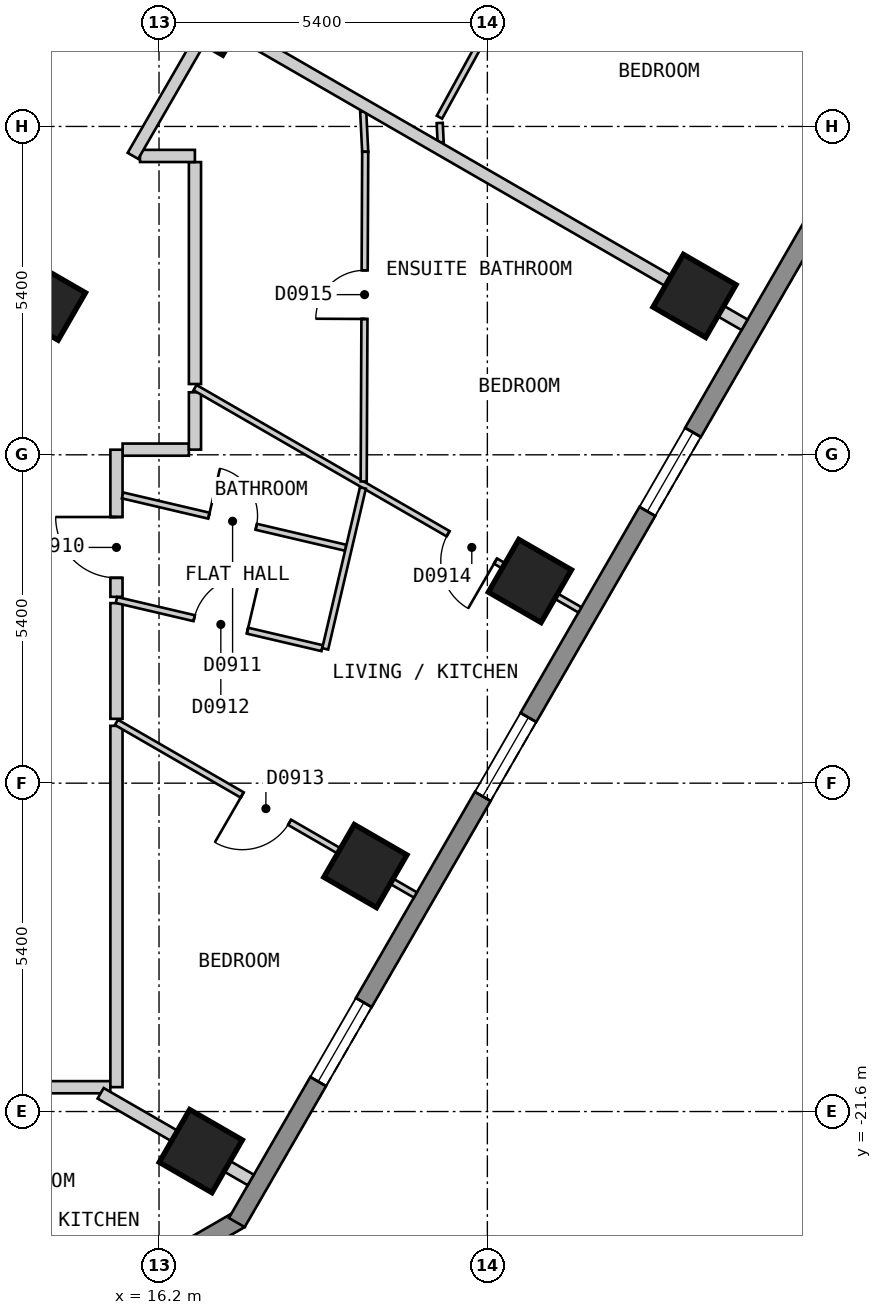
"""IFC4 building model, lengths in metres.
Left out: names, types, materials, properties, quantities, classifications, styles, units other than length and angle.
Written with IfcOpenShell. Run it as: python <this file> out.ifc"""

import sys

from ifc_helpers import new_model, si_unit, direction, frame, frame_2d, origin, origin_2d, place, context, subcontext, project, spatial, polyline, rectangle, outline, extrude, element, fill, save


model = new_model("IFC4")
c1 = context("Model", 3, precision=1e-05, world=origin(), true_north=direction((0.0, 1.0)))
c2 = subcontext(c1, "Body", "Model", "MODEL_VIEW")
j1 = project(units=[si_unit("LENGTHUNIT", "METRE"), si_unit("PLANEANGLEUNIT", "RADIAN")], contexts=[c1])
p1 = place(None, origin())
s1 = spatial("IfcSite", under=j1, at=p1, CompositionType="ELEMENT")
p2 = place(p1, origin())
s2 = spatial("IfcBuilding", under=s1, at=p2, CompositionType="ELEMENT")
p3 = place(p2, frame((0.0, 0.0, 90.0)))
s3 = spatial("IfcBuildingStorey", under=s2, at=p3, CompositionType="ELEMENT", Elevation=90.0)
for number, where, z_axis, x_axis in (
    (1, (16.887, -22.251, 0.0), (0.0, 0.0, 1.0), (0.5, 0.866, 0.0)),
    (2, (19.594, -17.563, 0.0), (0.0, 0.0, 1.0), (0.5, 0.866, 0.0)),
    (3, (22.3, -12.875, 0.0), (0.0, 0.0, 1.0), (0.5, 0.866, 0.0)),
    (4, (25.007, -8.187, 0.0), (0.0, 0.0, 1.0), (0.5, 0.866, 0.0)),
):
    element("IfcColumn", number, at=place(p3, frame(where, z_axis=z_axis, x_axis=x_axis)), inside=s3, PredefinedType="COLUMN", context=c2, shape_type="SweptSolid", body=[
        extrude(rectangle(XDim=1.0, YDim=1.0, at=origin_2d()), origin(), (0.0, 0.0, 1.0), 3.0),
    ])
for number, where, z_axis, x_axis in (
    (5, (14.376, -8.3, 0.0), (0.0, 0.0, 1.0), (0.5, 0.866, 0.0)),
    (6, (17.083, -3.612, 0.0), (0.0, 0.0, 1.0), (0.5, 0.866, 0.0)),
):
    element("IfcColumn", number, at=place(p3, frame(where, z_axis=z_axis, x_axis=x_axis)), inside=s3, PredefinedType="COLUMN", context=c2, shape_type="SweptSolid", body=[
        extrude(rectangle(XDim=0.9, YDim=0.9, at=origin_2d()), origin(), (0.0, 0.0, 1.0), 3.0),
    ])
p4 = place(p3, frame((13.204, -25.87, 0.0), z_axis=(0.0, 0.0, 1.0), x_axis=(0.866010750942, 0.50002537861, 0.0)))
e7 = element("IfcWall", 7, at=p4, inside=s3, PredefinedType="SOLIDWALL", context=c2, shape_type="SweptSolid", body=[
    extrude(outline(polyline([(0.0, -0.15), (5.0, -0.15), (4.919, 0.15), (0.08, 0.15), (0.0, -0.15)])), origin(), (0.0, 0.0, 1.0), 2.7),
])
p5 = place(p4, frame((0.65, 0.0, 0.15)))
e8 = element("IfcOpeningElement", 8, at=p5, cuts=e7, PredefinedType="OPENING", context=c2, shape_type="SweptSolid", body=[
    extrude(rectangle(XDim=1.2, YDim=2.1, at=frame_2d((0.6, 1.05))), frame((0.0, 0.16, 0.0), z_axis=(0.0, -1.0, 0.0), x_axis=(1.0, 0.0, 0.0)), (0.0, 0.0, 1.0), 0.32),
])
p6 = place(p3, frame((17.479, -23.425, 0.0), z_axis=(0.0, 0.0, 1.0), x_axis=(0.500035407905, 0.866004960056, 0.0)))
e9 = element("IfcWall", 9, at=p6, inside=s3, PredefinedType="SOLIDWALL", context=c2, shape_type="SweptSolid", body=[
    extrude(outline(polyline([(0.0, -0.15), (23.094, -0.15), (23.014, 0.15), (0.08, 0.15), (0.0, -0.15)])), origin(), (0.0, 0.0, 1.0), 2.7),
])
p7 = place(p6, frame((2.677, 0.0, 0.15)))
e10 = element("IfcOpeningElement", 10, at=p7, cuts=e9, PredefinedType="OPENING", context=c2, shape_type="SweptSolid", body=[
    extrude(rectangle(XDim=1.5, YDim=2.1, at=frame_2d((0.75, 1.05))), frame((0.0, 0.16, 0.0), z_axis=(0.0, -1.0, 0.0), x_axis=(1.0, 0.0, 0.0)), (0.0, 0.0, 1.0), 0.32),
])
p8 = place(p6, frame((8.091, 0.0, 0.15)))
e11 = element("IfcOpeningElement", 11, at=p8, cuts=e9, PredefinedType="OPENING", context=c2, shape_type="SweptSolid", body=[
    extrude(rectangle(XDim=1.5, YDim=2.1, at=frame_2d((0.75, 1.05))), frame((0.0, 0.16, 0.0), z_axis=(0.0, -1.0, 0.0), x_axis=(1.0, 0.0, 0.0)), (0.0, 0.0, 1.0), 0.32),
])
p9 = place(p6, frame((13.504, 0.0, 0.15)))
e12 = element("IfcOpeningElement", 12, at=p9, cuts=e9, PredefinedType="OPENING", context=c2, shape_type="SweptSolid", body=[
    extrude(rectangle(XDim=1.5, YDim=2.1, at=frame_2d((0.75, 1.05))), frame((0.0, 0.16, 0.0), z_axis=(0.0, -1.0, 0.0), x_axis=(1.0, 0.0, 0.0)), (0.0, 0.0, 1.0), 0.32),
])
p10 = place(p6, frame((18.917, 0.0, 0.15)))
e13 = element("IfcOpeningElement", 13, at=p10, cuts=e9, PredefinedType="OPENING", context=c2, shape_type="SweptSolid", body=[
    extrude(rectangle(XDim=1.5, YDim=2.1, at=frame_2d((0.75, 1.05))), frame((0.0, 0.16, 0.0), z_axis=(0.0, -1.0, 0.0), x_axis=(1.0, 0.0, 0.0)), (0.0, 0.0, 1.0), 0.32),
])
p11 = place(p3, frame((15.5, -13.239, 0.0), z_axis=(0.0, 0.0, 1.0), x_axis=(0.0, -1.0, 0.0)))
e14 = element("IfcWall", 14, at=p11, inside=s3, PredefinedType="PARTITIONING", context=c2, shape_type="SweptSolid", body=[
    extrude(rectangle(XDim=1.903, YDim=0.2, at=frame_2d((0.952, 0.0))), origin(), (0.0, 0.0, 1.0), 2.7),
])
p12 = place(p3, frame((16.791, -5.986, 0.0), z_axis=(0.0, 0.0, 1.0), x_axis=(0.0, -1.0, 0.0)))
e15 = element("IfcWall", 15, at=p12, inside=s3, PredefinedType="PARTITIONING", context=c2, shape_type="SweptSolid", body=[
    extrude(rectangle(XDim=3.65, YDim=0.2, at=frame_2d((1.825, 0.0))), origin(), (0.0, 0.0, 1.0), 2.7),
])
p13 = place(p3, frame((15.887, -5.885, 0.0), z_axis=(0.0, 0.0, 1.0), x_axis=(1.0, 0.0, 0.0)))
e16 = element("IfcWall", 16, at=p13, inside=s3, PredefinedType="PARTITIONING", context=c2, shape_type="SweptSolid", body=[
    extrude(rectangle(XDim=0.903, YDim=0.2, at=frame_2d((0.452, 0.0))), origin(), (0.0, 0.0, 1.0), 2.7),
])
p14 = place(p3, frame((15.601, -10.715, 0.0), z_axis=(0.0, 0.0, 1.0), x_axis=(1.0, 0.0, 0.0)))
e17 = element("IfcWall", 17, at=p14, inside=s3, PredefinedType="PARTITIONING", context=c2, shape_type="SweptSolid", body=[
    extrude(rectangle(XDim=1.09, YDim=0.2, at=frame_2d((0.545, 0.0))), origin(), (0.0, 0.0, 1.0), 2.7),
])
p15 = place(p3, frame((-15.499, -21.2, 0.0), z_axis=(0.0, 0.0, 1.0), x_axis=(1.0, 0.0, 0.0)))
e18 = element("IfcWall", 18, at=p15, inside=s3, PredefinedType="PARTITIONING", context=c2, shape_type="SweptSolid", body=[
    extrude(rectangle(XDim=30.898, YDim=0.2, at=frame_2d((15.449, 0.0))), origin(), (0.0, 0.0, 1.0), 2.7),
])
p16 = place(p15, frame((4.954, 0.0, 0.0)))
e19 = element("IfcOpeningElement", 19, at=p16, cuts=e18, PredefinedType="OPENING", context=c2, shape_type="SweptSolid", body=[
    extrude(rectangle(XDim=1.0, YDim=2.1, at=frame_2d((0.5, 1.05))), frame((0.0, 0.11, 0.0), z_axis=(0.0, -1.0, 0.0), x_axis=(1.0, 0.0, 0.0)), (0.0, 0.0, 1.0), 0.22),
])
p17 = place(p15, frame((25.046, 0.0, 0.0)))
e20 = element("IfcOpeningElement", 20, at=p17, cuts=e18, PredefinedType="OPENING", context=c2, shape_type="SweptSolid", body=[
    extrude(rectangle(XDim=1.0, YDim=2.1, at=frame_2d((0.5, 1.05))), frame((0.0, 0.11, 0.0), z_axis=(0.0, -1.0, 0.0), x_axis=(1.0, 0.0, 0.0)), (0.0, 0.0, 1.0), 0.22),
])
p18 = place(p3, frame((15.771, -5.884, 0.0), z_axis=(0.0, 0.0, 1.0), x_axis=(0.499939494019, 0.866060334111, 0.0)))
e21 = element("IfcWall", 21, at=p18, inside=s3, PredefinedType="PARTITIONING", context=c2, shape_type="SweptSolid", body=[
    extrude(rectangle(XDim=5.583, YDim=0.2, at=frame_2d((2.792, 0.0))), origin(), (0.0, 0.0, 1.0), 2.7),
])
p19 = place(p3, frame((15.5, -21.199, 0.0), z_axis=(0.0, 0.0, 1.0), x_axis=(0.0, 1.0, 0.0)))
e22 = element("IfcWall", 22, at=p19, inside=s3, PredefinedType="PARTITIONING", context=c2, shape_type="SweptSolid", body=[
    extrude(rectangle(XDim=5.942, YDim=0.2, at=frame_2d((2.971, 0.0))), origin(), (0.0, 0.0, 1.0), 2.7),
])
p20 = place(p3, frame((15.5, -13.136, 0.0), z_axis=(0.0, 0.0, 1.0), x_axis=(0.0, 1.0, 0.0)))
e23 = element("IfcWall", 23, at=p20, inside=s3, PredefinedType="PARTITIONING", context=c2, shape_type="SweptSolid", body=[
    extrude(rectangle(XDim=2.42, YDim=0.2, at=frame_2d((1.21, 0.0))), origin(), (0.0, 0.0, 1.0), 2.7),
])
p21 = place(p20, frame((0.313, 0.0, 0.0)))
e24 = element("IfcOpeningElement", 24, at=p21, cuts=e23, PredefinedType="OPENING", context=c2, shape_type="SweptSolid", body=[
    extrude(rectangle(XDim=1.0, YDim=2.1, at=frame_2d((0.5, 1.05))), frame((0.0, 0.11, 0.0), z_axis=(0.0, -1.0, 0.0), x_axis=(1.0, 0.0, 0.0)), (0.0, 0.0, 1.0), 0.22),
])
p22 = place(p3, frame((16.791, -10.715, 0.0), z_axis=(0.0, 0.0, 1.0), x_axis=(0.0, 1.0, 0.0)))
e25 = element("IfcWall", 25, at=p22, inside=s3, PredefinedType="PARTITIONING", context=c2, shape_type="SweptSolid", body=[
    extrude(rectangle(XDim=0.943, YDim=0.2, at=frame_2d((0.472, 0.0))), origin(), (0.0, 0.0, 1.0), 2.7),
])
p23 = place(p3, frame((19.558, -5.156, 0.0), z_axis=(0.0, 0.0, 1.0), x_axis=(0.04980880462, -0.998758771167, 0.0)))
e26 = element("IfcWall", 26, at=p23, inside=s3, PredefinedType="PARTITIONING", context=c2, shape_type="SweptSolid", body=[
    extrude(rectangle(XDim=0.662, YDim=0.1, at=frame_2d((0.331, 0.0))), origin(), (0.0, 0.0, 1.0), 2.7),
])
p24 = place(p3, frame((20.816, -5.343, 0.0), z_axis=(0.0, 0.0, 1.0), x_axis=(0.050626241319, -0.998717669659, 0.0)))
e27 = element("IfcWall", 27, at=p24, inside=s3, PredefinedType="PARTITIONING", context=c2, shape_type="SweptSolid", body=[
    extrude(rectangle(XDim=0.318, YDim=0.1, at=frame_2d((0.159, 0.0))), origin(), (0.0, 0.0, 1.0), 2.7),
])
p25 = place(p3, frame((15.6, -11.468, 0.0), z_axis=(0.0, 0.0, 1.0), x_axis=(0.973574036597, -0.228371616592, 0.0)))
e28 = element("IfcWall", 28, at=p25, inside=s3, PredefinedType="PARTITIONING", context=c2, shape_type="SweptSolid", body=[
    extrude(rectangle(XDim=3.771, YDim=0.1, at=frame_2d((1.885, 0.0))), origin(), (0.0, 0.0, 1.0), 2.7),
])
p26 = place(p25, frame((1.459, 0.0, 0.0)))
e29 = element("IfcOpeningElement", 29, at=p26, cuts=e28, PredefinedType="OPENING", context=c2, shape_type="SweptSolid", body=[
    extrude(rectangle(XDim=0.8, YDim=2.1, at=frame_2d((0.4, 1.05))), frame((0.0, 0.06, 0.0), z_axis=(0.0, -1.0, 0.0), x_axis=(1.0, 0.0, 0.0)), (0.0, 0.0, 1.0), 0.12),
])
p27 = place(p3, frame((15.5, -13.187, 0.0), z_axis=(0.0, 0.0, 1.0), x_axis=(0.973612163993, -0.228209014119, 0.0)))
e30 = element("IfcWall", 30, at=p27, inside=s3, PredefinedType="PARTITIONING", context=c2, shape_type="SweptSolid", body=[
    extrude(rectangle(XDim=3.475, YDim=0.1, at=frame_2d((1.737, 0.0))), origin(), (0.0, 0.0, 1.0), 2.7),
])
p28 = place(p27, frame((1.313, 0.0, 0.0)))
e31 = element("IfcOpeningElement", 31, at=p28, cuts=e30, PredefinedType="OPENING", context=c2, shape_type="SweptSolid", body=[
    extrude(rectangle(XDim=0.9, YDim=2.1, at=frame_2d((0.45, 1.05))), frame((0.0, 0.06, 0.0), z_axis=(0.0, -1.0, 0.0), x_axis=(1.0, 0.0, 0.0)), (0.0, 0.0, 1.0), 0.12),
])
p29 = place(p3, frame((15.5, -15.2, 0.0), z_axis=(0.0, 0.0, 1.0), x_axis=(0.866035181374, -0.499983064336, 0.0)))
e32 = element("IfcWall", 32, at=p29, inside=s3, PredefinedType="PARTITIONING", context=c2, shape_type="SweptSolid", body=[
    extrude(rectangle(XDim=5.677, YDim=0.1, at=frame_2d((2.838, 0.0))), origin(), (0.0, 0.0, 1.0), 2.7),
])
p30 = place(p29, frame((2.388, 0.0, 0.0)))
e33 = element("IfcOpeningElement", 33, at=p30, cuts=e32, PredefinedType="OPENING", context=c2, shape_type="SweptSolid", body=[
    extrude(rectangle(XDim=0.9, YDim=2.1, at=frame_2d((0.45, 1.05))), frame((0.0, 0.06, 0.0), z_axis=(0.0, -1.0, 0.0), x_axis=(1.0, 0.0, 0.0)), (0.0, 0.0, 1.0), 0.12),
])
p31 = place(p3, frame((16.792, -9.695, 0.0), z_axis=(0.0, 0.0, 1.0), x_axis=(0.86603765469, -0.499978780208, 0.0)))
e34 = element("IfcWall", 34, at=p31, inside=s3, PredefinedType="PARTITIONING", context=c2, shape_type="SweptSolid", body=[
    extrude(rectangle(XDim=7.31, YDim=0.1, at=frame_2d((3.655, 0.0))), origin(), (0.0, 0.0, 1.0), 2.7),
])
p32 = place(p31, frame((4.806, 0.0, 0.0)))
e35 = element("IfcOpeningElement", 35, at=p32, cuts=e34, PredefinedType="OPENING", context=c2, shape_type="SweptSolid", body=[
    extrude(rectangle(XDim=0.9, YDim=2.1, at=frame_2d((0.45, 1.05))), frame((0.0, 0.06, 0.0), z_axis=(0.0, -1.0, 0.0), x_axis=(1.0, 0.0, 0.0)), (0.0, 0.0, 1.0), 0.12),
])
p33 = place(p3, frame((20.812, -5.248, 0.0), z_axis=(0.0, 0.0, 1.0), x_axis=(0.481196609449, 0.876612698434, 0.0)))
e36 = element("IfcWall", 36, at=p33, inside=s3, PredefinedType="PARTITIONING", context=c2, shape_type="SweptSolid", body=[
    extrude(rectangle(XDim=4.79, YDim=0.1, at=frame_2d((2.395, 0.0))), origin(), (0.0, 0.0, 1.0), 2.7),
])
p34 = place(p33, frame((2.023, 0.0, 0.0)))
e37 = element("IfcOpeningElement", 37, at=p34, cuts=e36, PredefinedType="OPENING", context=c2, shape_type="SweptSolid", body=[
    extrude(rectangle(XDim=0.8, YDim=2.1, at=frame_2d((0.4, 1.05))), frame((0.0, 0.06, 0.0), z_axis=(0.0, -1.0, 0.0), x_axis=(1.0, 0.0, 0.0)), (0.0, 0.0, 1.0), 0.12),
])
p35 = place(p3, frame((18.933, -13.991, 0.0), z_axis=(0.0, 0.0, 1.0), x_axis=(0.228172687949, 0.97362067792, 0.0)))
e38 = element("IfcWall", 38, at=p35, inside=s3, PredefinedType="PARTITIONING", context=c2, shape_type="SweptSolid", body=[
    extrude(rectangle(XDim=2.717, YDim=0.1, at=frame_2d((1.358, 0.0))), origin(), (0.0, 0.0, 1.0), 2.7),
])
p36 = place(p3, frame((19.566, -11.238, 0.0), z_axis=(0.0, 0.0, 1.0), x_axis=(0.004638545009, 0.999989241892, 0.0)))
e39 = element("IfcWall", 39, at=p36, inside=s3, PredefinedType="PARTITIONING", context=c2, shape_type="SweptSolid", body=[
    extrude(rectangle(XDim=5.421, YDim=0.1, at=frame_2d((2.71, 0.0))), origin(), (0.0, 0.0, 1.0), 2.7),
])
p37 = place(p36, frame((2.672, 0.0, 0.0)))
e40 = element("IfcOpeningElement", 40, at=p37, cuts=e39, PredefinedType="OPENING", context=c2, shape_type="SweptSolid", body=[
    extrude(rectangle(XDim=0.8, YDim=2.1, at=frame_2d((0.4, 1.05))), frame((0.0, 0.06, 0.0), z_axis=(0.0, -1.0, 0.0), x_axis=(1.0, 0.0, 0.0)), (0.0, 0.0, 1.0), 0.12),
])
p38 = place(p3, frame((15.24, -21.3, 0.0), z_axis=(0.0, 0.0, 1.0), x_axis=(0.866090043625, -0.499888023795, 0.0)))
e41 = element("IfcWall", 41, at=p38, inside=s3, PredefinedType="PARTITIONING", context=c2, shape_type="SweptSolid", body=[
    extrude(rectangle(XDim=2.851, YDim=0.2, at=frame_2d((1.425, 0.0))), origin(), (0.0, 0.0, 1.0), 2.7),
])
p39 = place(p3, frame((17.169, -3.662, 0.0), z_axis=(0.0, 0.0, 1.0), x_axis=(0.866047370643, -0.499961950354, 0.0)))
e42 = element("IfcWall", 42, at=p39, inside=s3, PredefinedType="PARTITIONING", context=c2, shape_type="SweptSolid", body=[
    extrude(rectangle(XDim=10.001, YDim=0.2, at=frame_2d((5.0, 0.0))), origin(), (0.0, 0.0, 1.0), 2.7),
])
p40 = place(p7, origin())
e43 = element("IfcWindow", 43, at=p40, inside=s3, PartitioningType="SINGLE_PANEL", PredefinedType="WINDOW", context=c2, shape_type="SweptSolid", body=[
    extrude(rectangle(XDim=1.5, YDim=2.1, at=frame_2d((0.75, 1.05))), frame((0.0, 0.03, 0.0), z_axis=(0.0, -1.0, 0.0), x_axis=(1.0, 0.0, 0.0)), (0.0, 0.0, 1.0), 0.06),
])
fill(e10, e43)
p41 = place(p8, origin())
e44 = element("IfcWindow", 44, at=p41, inside=s3, PartitioningType="SINGLE_PANEL", PredefinedType="WINDOW", context=c2, shape_type="SweptSolid", body=[
    extrude(rectangle(XDim=1.5, YDim=2.1, at=frame_2d((0.75, 1.05))), frame((0.0, 0.03, 0.0), z_axis=(0.0, -1.0, 0.0), x_axis=(1.0, 0.0, 0.0)), (0.0, 0.0, 1.0), 0.06),
])
fill(e11, e44)
p42 = place(p9, origin())
e45 = element("IfcWindow", 45, at=p42, inside=s3, PartitioningType="SINGLE_PANEL", PredefinedType="WINDOW", context=c2, shape_type="SweptSolid", body=[
    extrude(rectangle(XDim=1.5, YDim=2.1, at=frame_2d((0.75, 1.05))), frame((0.0, 0.03, 0.0), z_axis=(0.0, -1.0, 0.0), x_axis=(1.0, 0.0, 0.0)), (0.0, 0.0, 1.0), 0.06),
])
fill(e12, e45)
p43 = place(p21, origin())
e46 = element("IfcDoor", 46, at=p43, inside=s3, OperationType="SINGLE_SWING_RIGHT", PredefinedType="DOOR", context=c2, shape_type="SweptSolid", body=[
    extrude(rectangle(XDim=1.0, YDim=2.1, at=frame_2d((0.5, 1.05))), frame((0.0, 0.025, 0.0), z_axis=(0.0, -1.0, 0.0), x_axis=(1.0, 0.0, 0.0)), (0.0, 0.0, 1.0), 0.05),
])
fill(e24, e46)
p44 = place(p26, origin())
e47 = element("IfcDoor", 47, at=p44, inside=s3, OperationType="SINGLE_SWING_LEFT", PredefinedType="DOOR", context=c2, shape_type="SweptSolid", body=[
    extrude(rectangle(XDim=0.8, YDim=2.1, at=frame_2d((0.4, 1.05))), frame((0.0, 0.025, 0.0), z_axis=(0.0, -1.0, 0.0), x_axis=(1.0, 0.0, 0.0)), (0.0, 0.0, 1.0), 0.05),
])
fill(e29, e47)
p45 = place(p28, origin())
e48 = element("IfcDoor", 48, at=p45, inside=s3, OperationType="SINGLE_SWING_RIGHT", PredefinedType="DOOR", context=c2, shape_type="SweptSolid", body=[
    extrude(rectangle(XDim=0.9, YDim=2.1, at=frame_2d((0.45, 1.05))), frame((0.0, 0.025, 0.0), z_axis=(0.0, -1.0, 0.0), x_axis=(1.0, 0.0, 0.0)), (0.0, 0.0, 1.0), 0.05),
])
fill(e31, e48)
p46 = place(p30, origin())
e49 = element("IfcDoor", 49, at=p46, inside=s3, OperationType="SINGLE_SWING_LEFT", PredefinedType="DOOR", context=c2, shape_type="SweptSolid", body=[
    extrude(rectangle(XDim=0.9, YDim=2.1, at=frame_2d((0.45, 1.05))), frame((0.0, 0.025, 0.0), z_axis=(0.0, -1.0, 0.0), x_axis=(1.0, 0.0, 0.0)), (0.0, 0.0, 1.0), 0.05),
])
fill(e33, e49)
p47 = place(p32, origin())
e50 = element("IfcDoor", 50, at=p47, inside=s3, OperationType="SINGLE_SWING_RIGHT", PredefinedType="DOOR", context=c2, shape_type="SweptSolid", body=[
    extrude(rectangle(XDim=0.9, YDim=2.1, at=frame_2d((0.45, 1.05))), frame((0.0, 0.025, 0.0), z_axis=(0.0, -1.0, 0.0), x_axis=(1.0, 0.0, 0.0)), (0.0, 0.0, 1.0), 0.05),
])
fill(e35, e50)
p48 = place(p37, origin())
e51 = element("IfcDoor", 51, at=p48, inside=s3, OperationType="SINGLE_SWING_LEFT", PredefinedType="DOOR", context=c2, shape_type="SweptSolid", body=[
    extrude(rectangle(XDim=0.8, YDim=2.1, at=frame_2d((0.4, 1.05))), frame((0.0, 0.025, 0.0), z_axis=(0.0, -1.0, 0.0), x_axis=(1.0, 0.0, 0.0)), (0.0, 0.0, 1.0), 0.05),
])
fill(e40, e51)
save(model, sys.argv[1])
